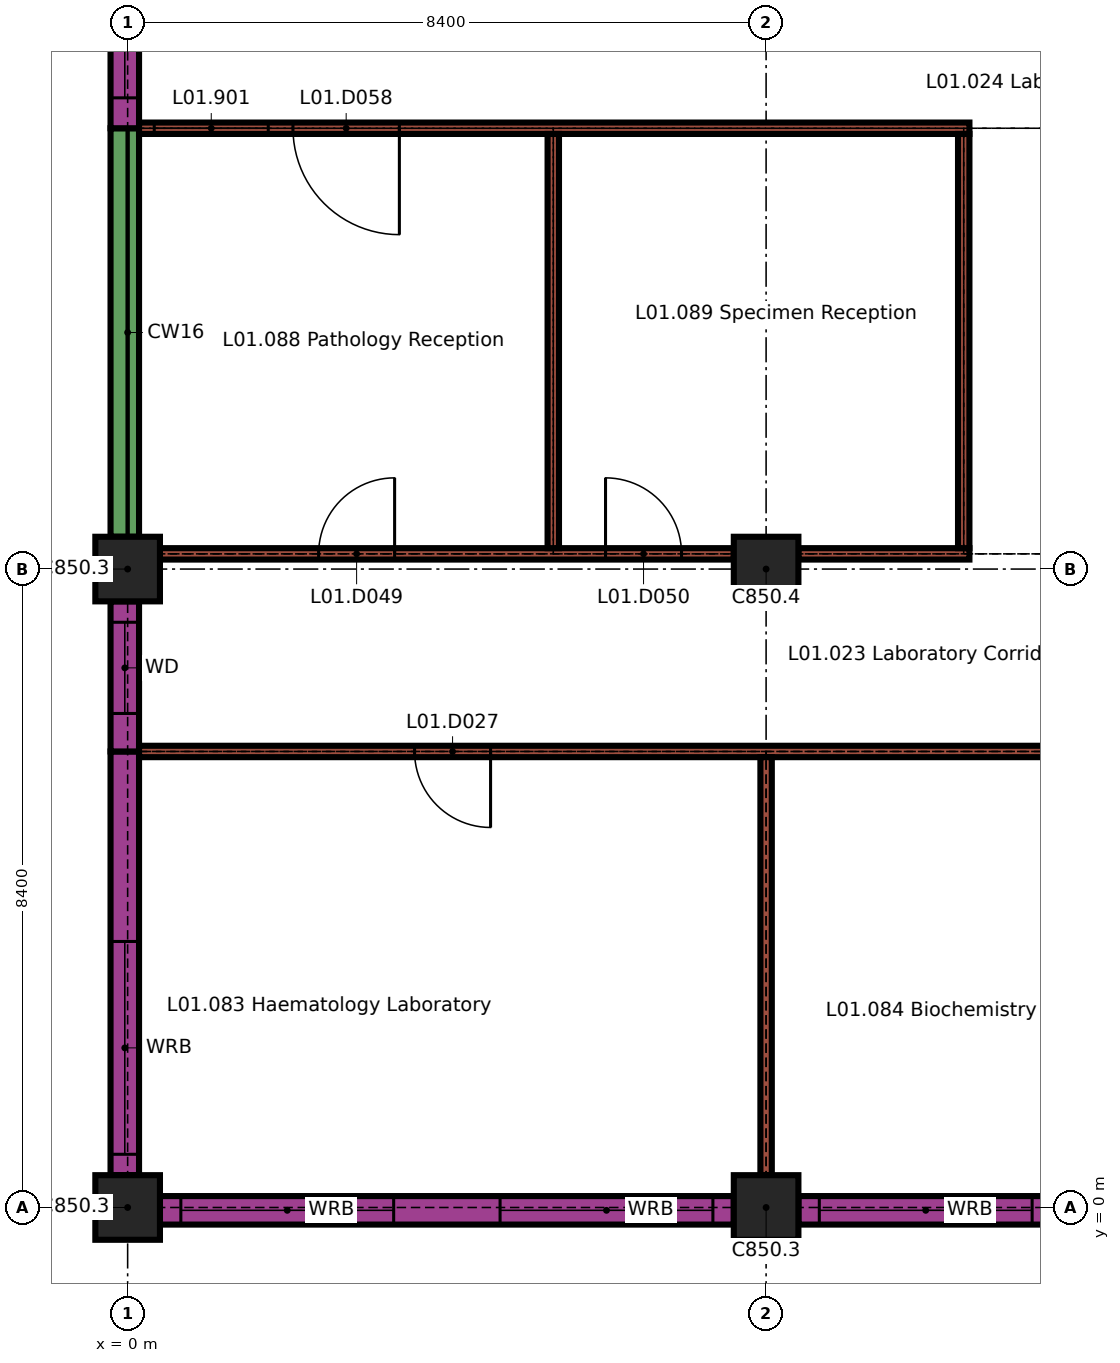
"""IFC4 building model, lengths in metres.
Left out: names, types, materials, properties, quantities, classifications, styles, units other than length and angle.
Written with IfcOpenShell. Run it as: python <this file> out.ifc"""

import sys

from ifc_helpers import new_model, si_unit, direction, frame, frame_2d, origin, origin_2d, place, context, subcontext, project, spatial, rectangle, extrude, element, fill, save


model = new_model("IFC4")
c1 = context("Model", 3, precision=1e-05, world=origin(), true_north=direction((0.0, 1.0)))
c2 = subcontext(c1, "Body", "Model", "MODEL_VIEW")
j1 = project(units=[si_unit("LENGTHUNIT", "METRE"), si_unit("PLANEANGLEUNIT", "RADIAN")], contexts=[c1])
p1 = place(None, origin())
s1 = spatial("IfcSite", under=j1, at=p1, CompositionType="ELEMENT")
p2 = place(p1, origin())
s2 = spatial("IfcBuilding", under=s1, at=p2, CompositionType="ELEMENT")
p3 = place(p2, frame((0.0, 0.0, 4.5)))
s3 = spatial("IfcBuildingStorey", under=s2, at=p3, CompositionType="ELEMENT", Elevation=4.5)
for number, where, z_axis, x_axis in (
    (1, (0.0, 0.0, 0.0), (0.0, 0.0, 1.0), (1.0, 0.0, 0.0)),
    (2, (8.4, 0.0, 0.0), (0.0, 0.0, 1.0), (1.0, 0.0, 0.0)),
    (3, (0.0, 8.4, 0.0), (0.0, 0.0, 1.0), (1.0, 0.0, 0.0)),
    (4, (8.4, 8.4, 0.0), (0.0, 0.0, 1.0), (1.0, 0.0, 0.0)),
):
    element("IfcColumn", number, at=place(p3, frame(where, z_axis=z_axis, x_axis=x_axis)), inside=s3, PredefinedType="COLUMN", context=c2, shape_type="SweptSolid", body=[
        extrude(rectangle(XDim=0.85, YDim=0.85, at=origin_2d()), origin(), (0.0, 0.0, 1.0), 3.45),
    ])
p4 = place(p3, frame((0.425, -0.038, 0.0), z_axis=(0.0, 0.0, 1.0), x_axis=(1.0, 0.0, 0.0)))
e5 = element("IfcWall", 5, at=p4, inside=s3, PredefinedType="SOLIDWALL", context=c2, shape_type="SweptSolid", body=[
    extrude(rectangle(XDim=7.55, YDim=0.375, at=frame_2d((3.775, 0.0))), origin(), (0.0, 0.0, 1.0), 3.15),
])
p5 = place(p4, frame((0.275, 0.0, 1.0)))
e6 = element("IfcOpeningElement", 6, at=p5, cuts=e5, PredefinedType="OPENING", context=c2, shape_type="SweptSolid", body=[
    extrude(rectangle(XDim=2.8, YDim=1.2, at=frame_2d((1.4, 0.6))), frame((0.0, 0.198, 0.0), z_axis=(0.0, -1.0, 0.0), x_axis=(1.0, 0.0, 0.0)), (0.0, 0.0, 1.0), 0.395),
])
p6 = place(p4, frame((4.475, 0.0, 1.0)))
e7 = element("IfcOpeningElement", 7, at=p6, cuts=e5, PredefinedType="OPENING", context=c2, shape_type="SweptSolid", body=[
    extrude(rectangle(XDim=2.8, YDim=1.2, at=frame_2d((1.4, 0.6))), frame((0.0, 0.198, 0.0), z_axis=(0.0, -1.0, 0.0), x_axis=(1.0, 0.0, 0.0)), (0.0, 0.0, 1.0), 0.395),
])
p7 = place(p3, frame((8.825, -0.038, 0.0), z_axis=(0.0, 0.0, 1.0), x_axis=(1.0, 0.0, 0.0)))
e8 = element("IfcWall", 8, at=p7, inside=s3, PredefinedType="SOLIDWALL", context=c2, shape_type="SweptSolid", body=[
    extrude(rectangle(XDim=7.55, YDim=0.375, at=frame_2d((3.775, 0.0))), origin(), (0.0, 0.0, 1.0), 3.15),
])
p8 = place(p7, frame((0.275, 0.0, 1.0)))
e9 = element("IfcOpeningElement", 9, at=p8, cuts=e8, PredefinedType="OPENING", context=c2, shape_type="SweptSolid", body=[
    extrude(rectangle(XDim=2.8, YDim=1.2, at=frame_2d((1.4, 0.6))), frame((0.0, 0.198, 0.0), z_axis=(0.0, -1.0, 0.0), x_axis=(1.0, 0.0, 0.0)), (0.0, 0.0, 1.0), 0.395),
])
p9 = place(p7, frame((4.475, 0.0, 1.0)))
e10 = element("IfcOpeningElement", 10, at=p9, cuts=e8, PredefinedType="OPENING", context=c2, shape_type="SweptSolid", body=[
    extrude(rectangle(XDim=2.8, YDim=1.2, at=frame_2d((1.4, 0.6))), frame((0.0, 0.198, 0.0), z_axis=(0.0, -1.0, 0.0), x_axis=(1.0, 0.0, 0.0)), (0.0, 0.0, 1.0), 0.395),
])
p10 = place(p3, frame((-0.038, 0.425, 0.0), z_axis=(0.0, 0.0, 1.0), x_axis=(0.0, 1.0, 0.0)))
e11 = element("IfcWall", 11, at=p10, inside=s3, PredefinedType="SOLIDWALL", context=c2, shape_type="SweptSolid", body=[
    extrude(rectangle(XDim=5.575, YDim=0.375, at=frame_2d((2.788, 0.0))), origin(), (0.0, 0.0, 1.0), 3.15),
])
p11 = place(p10, frame((0.275, 0.0, 1.0)))
e12 = element("IfcOpeningElement", 12, at=p11, cuts=e11, PredefinedType="OPENING", context=c2, shape_type="SweptSolid", body=[
    extrude(rectangle(XDim=2.8, YDim=1.2, at=frame_2d((1.4, 0.6))), frame((0.0, 0.198, 0.0), z_axis=(0.0, -1.0, 0.0), x_axis=(1.0, 0.0, 0.0)), (0.0, 0.0, 1.0), 0.395),
])
p12 = place(p3, frame((-0.038, 6.0, 0.0), z_axis=(0.0, 0.0, 1.0), x_axis=(0.0, 1.0, 0.0)))
e13 = element("IfcWall", 13, at=p12, inside=s3, PredefinedType="SOLIDWALL", context=c2, shape_type="SweptSolid", body=[
    extrude(rectangle(XDim=1.975, YDim=0.375, at=frame_2d((0.988, 0.0))), origin(), (0.0, 0.0, 1.0), 3.15),
])
p13 = place(p12, frame((0.5, 0.0, 0.9)))
e14 = element("IfcOpeningElement", 14, at=p13, cuts=e13, PredefinedType="OPENING", context=c2, shape_type="SweptSolid", body=[
    extrude(rectangle(XDim=1.2, YDim=1.5, at=frame_2d((0.6, 0.75))), frame((0.0, 0.198, 0.0), z_axis=(0.0, -1.0, 0.0), x_axis=(1.0, 0.0, 0.0)), (0.0, 0.0, 1.0), 0.395),
])
p14 = place(p3, frame((-0.038, 8.825, 0.0), z_axis=(0.0, 0.0, 1.0), x_axis=(0.0, 1.0, 0.0)))
e15 = element("IfcWall", 15, at=p14, inside=s3, PredefinedType="SOLIDWALL", context=c2, shape_type="SweptSolid", body=[
    extrude(rectangle(XDim=5.375, YDim=0.375, at=frame_2d((2.688, 0.0))), origin(), (0.0, 0.0, 1.0), 0.45),
])
p15 = place(p3, frame((-0.038, 14.2, 0.0), z_axis=(0.0, 0.0, 1.0), x_axis=(0.0, 1.0, 0.0)))
e16 = element("IfcWall", 16, at=p15, inside=s3, PredefinedType="SOLIDWALL", context=c2, shape_type="SweptSolid", body=[
    extrude(rectangle(XDim=2.6, YDim=0.375, at=frame_2d((1.3, 0.0))), origin(), (0.0, 0.0, 1.0), 3.15),
])
p16 = place(p15, frame((0.4, 0.0, 0.9)))
e17 = element("IfcOpeningElement", 17, at=p16, cuts=e16, PredefinedType="OPENING", context=c2, shape_type="SweptSolid", body=[
    extrude(rectangle(XDim=1.8, YDim=1.5, at=frame_2d((0.9, 0.75))), frame((0.0, 0.198, 0.0), z_axis=(0.0, -1.0, 0.0), x_axis=(1.0, 0.0, 0.0)), (0.0, 0.0, 1.0), 0.395),
])
p17 = place(p3, frame((0.15, 6.0, 0.0), z_axis=(0.0, 0.0, 1.0), x_axis=(1.0, 0.0, 0.0)))
e18 = element("IfcWall", 18, at=p17, inside=s3, PredefinedType="PARTITIONING", context=c2, shape_type="SweptSolid", body=[
    extrude(rectangle(XDim=24.925, YDim=0.15, at=frame_2d((12.462, 0.0))), origin(), (0.0, 0.0, 1.0), 3.45),
])
p18 = place(p17, frame((3.625, 0.0, 0.0)))
e19 = element("IfcOpeningElement", 19, at=p18, cuts=e18, PredefinedType="OPENING", context=c2, shape_type="SweptSolid", body=[
    extrude(rectangle(XDim=1.0, YDim=2.1, at=frame_2d((0.5, 1.05))), frame((0.0, 0.085, 0.0), z_axis=(0.0, -1.0, 0.0), x_axis=(1.0, 0.0, 0.0)), (0.0, 0.0, 1.0), 0.17),
])
p19 = place(p17, frame((11.95, 0.0, 0.0)))
e20 = element("IfcOpeningElement", 20, at=p19, cuts=e18, PredefinedType="OPENING", context=c2, shape_type="SweptSolid", body=[
    extrude(rectangle(XDim=1.0, YDim=2.1, at=frame_2d((0.5, 1.05))), frame((0.0, 0.085, 0.0), z_axis=(0.0, -1.0, 0.0), x_axis=(1.0, 0.0, 0.0)), (0.0, 0.0, 1.0), 0.17),
])
p20 = place(p17, frame((19.05, 0.0, 0.0)))
e21 = element("IfcOpeningElement", 21, at=p20, cuts=e18, PredefinedType="OPENING", context=c2, shape_type="SweptSolid", body=[
    extrude(rectangle(XDim=1.0, YDim=2.1, at=frame_2d((0.5, 1.05))), frame((0.0, 0.085, 0.0), z_axis=(0.0, -1.0, 0.0), x_axis=(1.0, 0.0, 0.0)), (0.0, 0.0, 1.0), 0.17),
])
p21 = place(p17, frame((23.188, 0.0, 0.0)))
e22 = element("IfcOpeningElement", 22, at=p21, cuts=e18, PredefinedType="OPENING", context=c2, shape_type="SweptSolid", body=[
    extrude(rectangle(XDim=1.0, YDim=2.1, at=frame_2d((0.5, 1.05))), frame((0.0, 0.085, 0.0), z_axis=(0.0, -1.0, 0.0), x_axis=(1.0, 0.0, 0.0)), (0.0, 0.0, 1.0), 0.17),
])
p22 = place(p3, frame((0.425, 8.6, 0.0), z_axis=(0.0, 0.0, 1.0), x_axis=(1.0, 0.0, 0.0)))
e23 = element("IfcWall", 23, at=p22, inside=s3, PredefinedType="PARTITIONING", context=c2, shape_type="SweptSolid", body=[
    extrude(rectangle(XDim=7.55, YDim=0.15, at=frame_2d((3.775, 0.0))), origin(), (0.0, 0.0, 1.0), 3.45),
])
p23 = place(p22, frame((2.087, 0.0, 0.0)))
e24 = element("IfcOpeningElement", 24, at=p23, cuts=e23, PredefinedType="OPENING", context=c2, shape_type="SweptSolid", body=[
    extrude(rectangle(XDim=1.0, YDim=2.1, at=frame_2d((0.5, 1.05))), frame((0.0, 0.085, 0.0), z_axis=(0.0, -1.0, 0.0), x_axis=(1.0, 0.0, 0.0)), (0.0, 0.0, 1.0), 0.17),
])
p24 = place(p22, frame((5.863, 0.0, 0.0)))
e25 = element("IfcOpeningElement", 25, at=p24, cuts=e23, PredefinedType="OPENING", context=c2, shape_type="SweptSolid", body=[
    extrude(rectangle(XDim=1.0, YDim=2.1, at=frame_2d((0.5, 1.05))), frame((0.0, 0.085, 0.0), z_axis=(0.0, -1.0, 0.0), x_axis=(1.0, 0.0, 0.0)), (0.0, 0.0, 1.0), 0.17),
])
p25 = place(p3, frame((8.825, 8.6, 0.0), z_axis=(0.0, 0.0, 1.0), x_axis=(1.0, 0.0, 0.0)))
e26 = element("IfcWall", 26, at=p25, inside=s3, PredefinedType="PARTITIONING", context=c2, shape_type="SweptSolid", body=[
    extrude(rectangle(XDim=2.25, YDim=0.15, at=frame_2d((1.125, 0.0))), origin(), (0.0, 0.0, 1.0), 3.45),
])
p26 = place(p3, frame((0.15, 14.2, 0.0), z_axis=(0.0, 0.0, 1.0), x_axis=(1.0, 0.0, 0.0)))
e27 = element("IfcWall", 27, at=p26, inside=s3, PredefinedType="PARTITIONING", context=c2, shape_type="SweptSolid", body=[
    extrude(rectangle(XDim=10.925, YDim=0.15, at=frame_2d((5.462, 0.0))), origin(), (0.0, 0.0, 1.0), 3.45),
])
p27 = place(p26, frame((2.025, 0.0, 0.0)))
e28 = element("IfcOpeningElement", 28, at=p27, cuts=e27, PredefinedType="OPENING", context=c2, shape_type="SweptSolid", body=[
    extrude(rectangle(XDim=1.4, YDim=2.1, at=frame_2d((0.7, 1.05))), frame((0.0, 0.085, 0.0), z_axis=(0.0, -1.0, 0.0), x_axis=(1.0, 0.0, 0.0)), (0.0, 0.0, 1.0), 0.17),
])
p28 = place(p26, frame((0.2, 0.0, 0.9)))
e29 = element("IfcOpeningElement", 29, at=p28, cuts=e27, PredefinedType="OPENING", context=c2, shape_type="SweptSolid", body=[
    extrude(rectangle(XDim=1.5, YDim=1.0, at=frame_2d((0.75, 0.5))), frame((0.0, 0.085, 0.0), z_axis=(0.0, -1.0, 0.0), x_axis=(1.0, 0.0, 0.0)), (0.0, 0.0, 1.0), 0.17),
])
p29 = place(p3, frame((5.6, 8.675, 0.0), z_axis=(0.0, 0.0, 1.0), x_axis=(0.0, 1.0, 0.0)))
e30 = element("IfcWall", 30, at=p29, inside=s3, PredefinedType="PARTITIONING", context=c2, shape_type="SweptSolid", body=[
    extrude(rectangle(XDim=5.45, YDim=0.15, at=frame_2d((2.725, 0.0))), origin(), (0.0, 0.0, 1.0), 3.45),
])
p30 = place(p3, frame((8.4, 0.425, 0.0), z_axis=(0.0, 0.0, 1.0), x_axis=(0.0, 1.0, 0.0)))
e31 = element("IfcWall", 31, at=p30, inside=s3, PredefinedType="PARTITIONING", context=c2, shape_type="SweptSolid", body=[
    extrude(rectangle(XDim=5.5, YDim=0.15, at=frame_2d((2.75, 0.0))), origin(), (0.0, 0.0, 1.0), 3.45),
])
p31 = place(p3, frame((11.0, 8.675, 0.0), z_axis=(0.0, 0.0, 1.0), x_axis=(0.0, 1.0, 0.0)))
e32 = element("IfcWall", 32, at=p31, inside=s3, PredefinedType="PARTITIONING", context=c2, shape_type="SweptSolid", body=[
    extrude(rectangle(XDim=5.45, YDim=0.15, at=frame_2d((2.725, 0.0))), origin(), (0.0, 0.0, 1.0), 3.45),
])
p32 = place(p5, origin())
e33 = element("IfcWindow", 33, at=p32, inside=s3, PartitioningType="DOUBLE_PANEL_VERTICAL", PredefinedType="WINDOW", context=c2, shape_type="SweptSolid", body=[
    extrude(rectangle(XDim=2.8, YDim=1.2, at=frame_2d((1.4, 0.6))), frame((0.0, 0.03, 0.0), z_axis=(0.0, -1.0, 0.0), x_axis=(1.0, 0.0, 0.0)), (0.0, 0.0, 1.0), 0.06),
])
fill(e6, e33)
p33 = place(p6, origin())
e34 = element("IfcWindow", 34, at=p33, inside=s3, PartitioningType="DOUBLE_PANEL_VERTICAL", PredefinedType="WINDOW", context=c2, shape_type="SweptSolid", body=[
    extrude(rectangle(XDim=2.8, YDim=1.2, at=frame_2d((1.4, 0.6))), frame((0.0, 0.03, 0.0), z_axis=(0.0, -1.0, 0.0), x_axis=(1.0, 0.0, 0.0)), (0.0, 0.0, 1.0), 0.06),
])
fill(e7, e34)
p34 = place(p8, origin())
e35 = element("IfcWindow", 35, at=p34, inside=s3, PartitioningType="DOUBLE_PANEL_VERTICAL", PredefinedType="WINDOW", context=c2, shape_type="SweptSolid", body=[
    extrude(rectangle(XDim=2.8, YDim=1.2, at=frame_2d((1.4, 0.6))), frame((0.0, 0.03, 0.0), z_axis=(0.0, -1.0, 0.0), x_axis=(1.0, 0.0, 0.0)), (0.0, 0.0, 1.0), 0.06),
])
fill(e9, e35)
p35 = place(p11, origin())
e36 = element("IfcWindow", 36, at=p35, inside=s3, PartitioningType="DOUBLE_PANEL_VERTICAL", PredefinedType="WINDOW", context=c2, shape_type="SweptSolid", body=[
    extrude(rectangle(XDim=2.8, YDim=1.2, at=frame_2d((1.4, 0.6))), frame((0.0, 0.03, 0.0), z_axis=(0.0, -1.0, 0.0), x_axis=(1.0, 0.0, 0.0)), (0.0, 0.0, 1.0), 0.06),
])
fill(e12, e36)
p36 = place(p13, origin())
e37 = element("IfcWindow", 37, at=p36, inside=s3, PartitioningType="SINGLE_PANEL", PredefinedType="WINDOW", context=c2, shape_type="SweptSolid", body=[
    extrude(rectangle(XDim=1.2, YDim=1.5, at=frame_2d((0.6, 0.75))), frame((0.0, 0.03, 0.0), z_axis=(0.0, -1.0, 0.0), x_axis=(1.0, 0.0, 0.0)), (0.0, 0.0, 1.0), 0.06),
])
fill(e14, e37)
p37 = place(p16, origin())
e38 = element("IfcWindow", 38, at=p37, inside=s3, PartitioningType="DOUBLE_PANEL_VERTICAL", PredefinedType="WINDOW", context=c2, shape_type="SweptSolid", body=[
    extrude(rectangle(XDim=1.8, YDim=1.5, at=frame_2d((0.9, 0.75))), frame((0.0, 0.03, 0.0), z_axis=(0.0, -1.0, 0.0), x_axis=(1.0, 0.0, 0.0)), (0.0, 0.0, 1.0), 0.06),
])
fill(e17, e38)
p38 = place(p18, origin())
e39 = element("IfcDoor", 39, at=p38, inside=s3, OperationType="SINGLE_SWING_RIGHT", PredefinedType="DOOR", context=c2, shape_type="SweptSolid", body=[
    extrude(rectangle(XDim=1.0, YDim=2.1, at=frame_2d((0.5, 1.05))), frame((0.0, 0.025, 0.0), z_axis=(0.0, -1.0, 0.0), x_axis=(1.0, 0.0, 0.0)), (0.0, 0.0, 1.0), 0.05),
])
fill(e19, e39)
p39 = place(p23, origin())
e40 = element("IfcDoor", 40, at=p39, inside=s3, OperationType="SINGLE_SWING_LEFT", PredefinedType="DOOR", context=c2, shape_type="SweptSolid", body=[
    extrude(rectangle(XDim=1.0, YDim=2.1, at=frame_2d((0.5, 1.05))), frame((0.0, 0.025, 0.0), z_axis=(0.0, -1.0, 0.0), x_axis=(1.0, 0.0, 0.0)), (0.0, 0.0, 1.0), 0.05),
])
fill(e24, e40)
p40 = place(p24, origin())
e41 = element("IfcDoor", 41, at=p40, inside=s3, OperationType="SINGLE_SWING_RIGHT", PredefinedType="DOOR", context=c2, shape_type="SweptSolid", body=[
    extrude(rectangle(XDim=1.0, YDim=2.1, at=frame_2d((0.5, 1.05))), frame((0.0, 0.025, 0.0), z_axis=(0.0, -1.0, 0.0), x_axis=(1.0, 0.0, 0.0)), (0.0, 0.0, 1.0), 0.05),
])
fill(e25, e41)
p41 = place(p27, origin())
e42 = element("IfcDoor", 42, at=p41, inside=s3, OperationType="SINGLE_SWING_RIGHT", PredefinedType="DOOR", context=c2, shape_type="SweptSolid", body=[
    extrude(rectangle(XDim=1.4, YDim=2.1, at=frame_2d((0.7, 1.05))), frame((0.0, 0.025, 0.0), z_axis=(0.0, -1.0, 0.0), x_axis=(1.0, 0.0, 0.0)), (0.0, 0.0, 1.0), 0.05),
])
fill(e28, e42)
p42 = place(p28, origin())
e43 = element("IfcWindow", 43, at=p42, inside=s3, PartitioningType="DOUBLE_PANEL_HORIZONTAL", PredefinedType="WINDOW", context=c2, shape_type="SweptSolid", body=[
    extrude(rectangle(XDim=1.5, YDim=1.0, at=frame_2d((0.75, 0.5))), frame((0.0, 0.025, 0.0), z_axis=(0.0, -1.0, 0.0), x_axis=(1.0, 0.0, 0.0)), (0.0, 0.0, 1.0), 0.05),
])
fill(e29, e43)
save(model, sys.argv[1])
